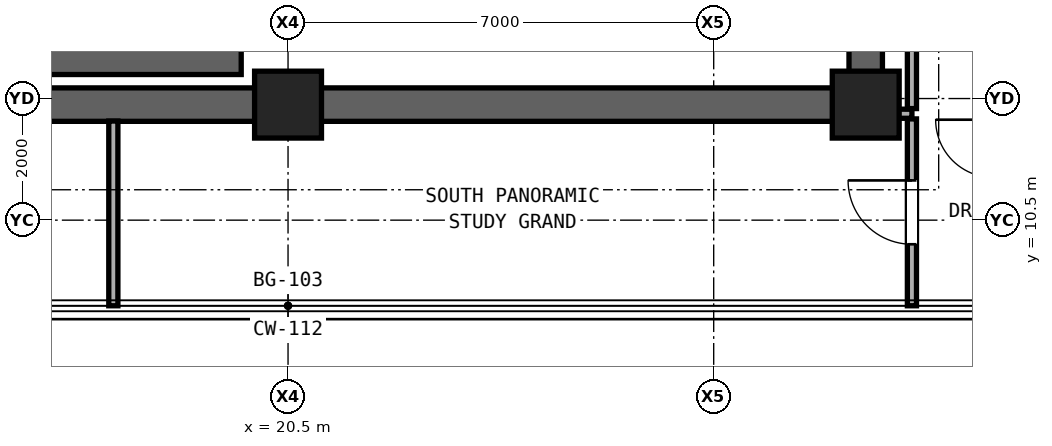
"""IFC4 building model, lengths in metres.
Left out: names, types, materials, properties, quantities, classifications, styles, units other than length and angle.
Written with IfcOpenShell. Run it as: python <this file> out.ifc"""

import sys

from ifc_helpers import new_model, si_unit, direction, frame, frame_2d, origin, origin_2d, place, context, subcontext, project, spatial, rectangle, extrude, element, fill, save


model = new_model("IFC4")
c1 = context("Model", 3, precision=1e-05, world=origin(), true_north=direction((0.0, 1.0)))
c2 = subcontext(c1, "Body", "Model", "MODEL_VIEW")
j1 = project(units=[si_unit("LENGTHUNIT", "METRE"), si_unit("PLANEANGLEUNIT", "RADIAN")], contexts=[c1])
p1 = place(None, origin())
s1 = spatial("IfcSite", under=j1, at=p1, CompositionType="ELEMENT")
p2 = place(p1, origin())
s2 = spatial("IfcBuilding", under=s1, at=p2, CompositionType="ELEMENT")
p3 = place(p2, frame((0.0, 0.0, 137.9)))
s3 = spatial("IfcBuildingStorey", under=s2, at=p3, CompositionType="ELEMENT", Elevation=137.9)
for number, where, z_axis, x_axis in (
    (1, (20.5, 12.4, 0.0), (0.0, 0.0, 1.0), (1.0, 0.0, 0.0)),
    (2, (30.0, 12.4, 0.0), (0.0, 0.0, 1.0), (1.0, 0.0, 0.0)),
):
    element("IfcColumn", number, at=place(p3, frame(where, z_axis=z_axis, x_axis=x_axis)), inside=s3, PredefinedType="COLUMN", context=c2, shape_type="SweptSolid", body=[
        extrude(rectangle(XDim=1.1, YDim=1.1, at=origin_2d()), origin(), (0.0, 0.0, 1.0), 3.3),
    ])
p4 = place(p3, frame((11.0, 12.4, 0.0), z_axis=(0.0, 0.0, 1.0), x_axis=(1.0, 0.0, 0.0)))
e3 = element("IfcWall", 3, at=p4, inside=s3, PredefinedType="SHEAR", context=c2, shape_type="SweptSolid", body=[
    extrude(rectangle(XDim=19.0, YDim=0.55, at=frame_2d((9.5, 0.0))), origin(), (0.0, 0.0, 1.0), 3.08),
])
p5 = place(p3, frame((30.0, 12.4, 0.0), z_axis=(0.0, 0.0, 1.0), x_axis=(0.0, 1.0, 0.0)))
e4 = element("IfcWall", 4, at=p5, inside=s3, PredefinedType="SHEAR", context=c2, shape_type="SweptSolid", body=[
    extrude(rectangle(XDim=6.0, YDim=0.55, at=frame_2d((3.0, 0.0))), origin(), (0.0, 0.0, 1.0), 3.08),
])
p6 = place(p3, frame((30.27, 12.25, 0.0), z_axis=(0.0, 0.0, 1.0), x_axis=(1.0, 0.0, 0.0)))
e5 = element("IfcWall", 5, at=p6, inside=s3, PredefinedType="PARTITIONING", context=c2, shape_type="SweptSolid", body=[
    extrude(rectangle(XDim=0.49, YDim=0.15, at=frame_2d((0.245, 0.0))), origin(), (0.0, 0.0, 1.0), 3.08),
])
p7 = place(p3, frame((11.27, 13.12, 0.0), z_axis=(0.0, 0.0, 1.0), x_axis=(1.0, 0.0, 0.0)))
e6 = element("IfcWall", 6, at=p7, inside=s3, PredefinedType="SHEAR", context=c2, shape_type="SweptSolid", body=[
    extrude(rectangle(XDim=8.46, YDim=0.45, at=frame_2d((4.23, 0.0))), origin(), (0.0, 0.0, 1.0), 3.08),
])
p8 = place(p3, frame((17.627, 9.092, 0.0), z_axis=(0.0, 0.0, 1.0), x_axis=(0.0, 1.0, 0.0)))
e7 = element("IfcWall", 7, at=p8, inside=s3, PredefinedType="PARTITIONING", context=c2, shape_type="SweptSolid", body=[
    extrude(rectangle(XDim=3.038, YDim=0.15, at=frame_2d((1.519, 0.0))), origin(), (0.0, 0.0, 1.0), 3.08),
])
p9 = place(p3, frame((30.76, 9.092, 0.0), z_axis=(0.0, 0.0, 1.0), x_axis=(0.0, 1.0, 0.0)))
e8 = element("IfcWall", 8, at=p9, inside=s3, PredefinedType="PARTITIONING", context=c2, shape_type="SweptSolid", body=[
    extrude(rectangle(XDim=3.073, YDim=0.15, at=frame_2d((1.537, 0.0))), origin(), (0.0, 0.0, 1.0), 3.08),
])
p10 = place(p9, frame((1.011, 0.0, 0.0)))
e9 = element("IfcOpeningElement", 9, at=p10, cuts=e8, PredefinedType="OPENING", context=c2, shape_type="SweptSolid", body=[
    extrude(rectangle(XDim=1.05, YDim=2.2, at=frame_2d((0.525, 1.1))), frame((0.0, 0.085, 0.0), z_axis=(0.0, -1.0, 0.0), x_axis=(1.0, 0.0, 0.0)), (0.0, 0.0, 1.0), 0.17),
])
p11 = place(p3, frame((30.76, 12.335, 0.0), z_axis=(0.0, 0.0, 1.0), x_axis=(0.0, 1.0, 0.0)))
e10 = element("IfcWall", 10, at=p11, inside=s3, PredefinedType="PARTITIONING", context=c2, shape_type="SweptSolid", body=[
    extrude(rectangle(XDim=5.98, YDim=0.15, at=frame_2d((2.99, 0.0))), origin(), (0.0, 0.0, 1.0), 2.456),
])
p12 = place(p10, origin())
e11 = element("IfcDoor", 11, at=p12, inside=s3, OperationType="SINGLE_SWING_RIGHT", PredefinedType="DOOR", context=c2, shape_type="SweptSolid", body=[
    extrude(rectangle(XDim=1.05, YDim=2.2, at=frame_2d((0.525, 1.1))), frame((0.0, 0.025, 0.0), z_axis=(0.0, -1.0, 0.0), x_axis=(1.0, 0.0, 0.0)), (0.0, 0.0, 1.0), 0.05),
])
fill(e9, e11)
save(model, sys.argv[1])
